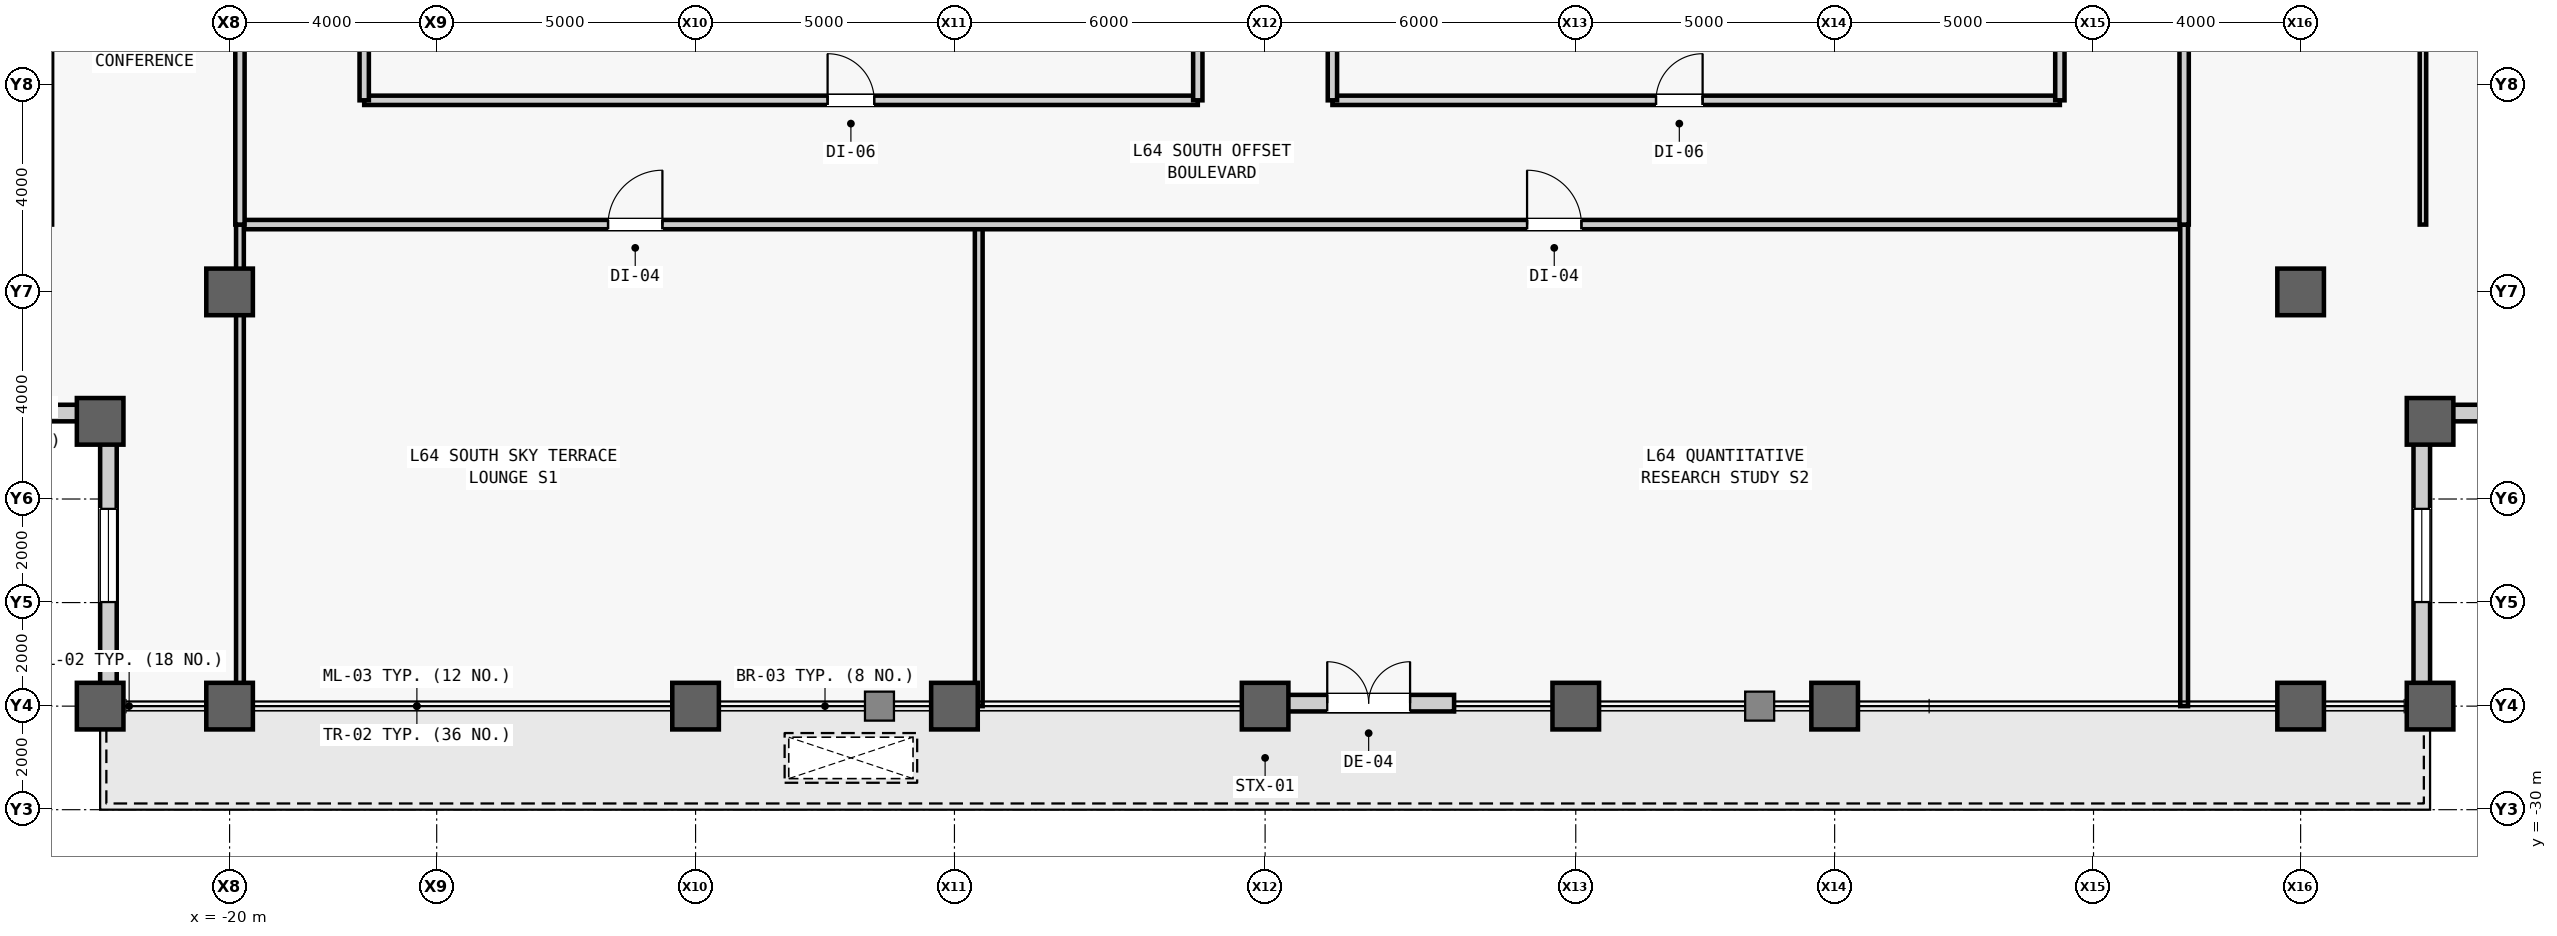
"""IFC4 building model, lengths in metres.
Left out: names, types, materials, properties, quantities, classifications, styles, units other than length and angle.
Written with IfcOpenShell. Run it as: python <this file> out.ifc"""

import sys

from ifc_helpers import new_model, si_unit, direction, frame, frame_2d, origin, origin_2d, place, context, subcontext, project, spatial, rectangle, hollow_rectangle, extrude, source, transform, mapped, element, fill, save


model = new_model("IFC4")
c1 = context("Model", 3, precision=1e-05, world=origin(), true_north=direction((0.0, 1.0)))
c2 = subcontext(c1, "Body", "Model", "MODEL_VIEW")
j1 = project(units=[si_unit("LENGTHUNIT", "METRE"), si_unit("PLANEANGLEUNIT", "RADIAN")], contexts=[c1])
p1 = place(None, origin())
s1 = spatial("IfcSite", under=j1, at=p1, CompositionType="ELEMENT")
p2 = place(p1, origin())
s2 = spatial("IfcBuilding", under=s1, at=p2, CompositionType="ELEMENT")
p3 = place(p2, frame((0.0, 0.0, 273.5)))
s3 = spatial("IfcBuildingStorey", under=s2, at=p3, CompositionType="ELEMENT", Elevation=273.5)
m1 = source(origin(), c2, "Body", "SweptSolid", [
    extrude(hollow_rectangle(XDim=0.9, YDim=0.9, WallThickness=0.05, at=origin_2d()), origin(), (0.0, 0.0, 1.0), 4.0),
])
for number, where, z_axis, x_axis in (
    (1, (-22.5, -28.0, 0.0), (0.0, 0.0, 1.0), (1.0, 0.0, 0.0)),
    (2, (-22.5, -22.5, 0.0), (0.0, 0.0, 1.0), (1.0, 0.0, 0.0)),
    (3, (-20.0, -28.0, 0.0), (0.0, 0.0, 1.0), (1.0, 0.0, 0.0)),
    (4, (-20.0, -20.0, 0.0), (0.0, 0.0, 1.0), (1.0, 0.0, 0.0)),
    (5, (-11.0, -28.0, 0.0), (0.0, 0.0, 1.0), (1.0, 0.0, 0.0)),
    (6, (-6.0, -28.0, 0.0), (0.0, 0.0, 1.0), (1.0, 0.0, 0.0)),
    (7, (0.0, -28.0, 0.0), (0.0, 0.0, 1.0), (1.0, 0.0, 0.0)),
    (8, (6.0, -28.0, 0.0), (0.0, 0.0, 1.0), (1.0, 0.0, 0.0)),
    (9, (11.0, -28.0, 0.0), (0.0, 0.0, 1.0), (1.0, 0.0, 0.0)),
    (10, (20.0, -28.0, 0.0), (0.0, 0.0, 1.0), (1.0, 0.0, 0.0)),
    (11, (20.0, -20.0, 0.0), (0.0, 0.0, 1.0), (1.0, 0.0, 0.0)),
    (12, (22.5, -28.0, 0.0), (0.0, 0.0, 1.0), (1.0, 0.0, 0.0)),
    (13, (22.5, -22.5, 0.0), (0.0, 0.0, 1.0), (1.0, 0.0, 0.0)),
):
    element("IfcColumn", number, at=place(p3, frame(where, z_axis=z_axis, x_axis=x_axis)), inside=s3, PredefinedType="COLUMN", context=c2, shape_type="MappedRepresentation", body=[
        mapped(m1, transform((0.0, 0.0, 0.0), scale=1.0)),
    ])
m2 = source(origin(), c2, "Body", "SweptSolid", [
    extrude(rectangle(XDim=5.18, YDim=0.32, at=frame_2d((2.59, 0.0))), origin(), (0.0, 0.0, 1.0), 3.231),
])
p4 = place(p3, frame((-22.5, -22.34, 0.0), z_axis=(0.0, 0.0, 1.0), x_axis=(-1.0, 0.0, 0.0)))
e14 = element("IfcWall", 14, at=p4, inside=s3, PredefinedType="STANDARD", context=c2, shape_type="MappedRepresentation", body=[
    mapped(m2, transform((0.0, 0.0, 0.0), scale=1.0)),
])
m3 = source(origin(), c2, "Body", "SweptSolid", [
    extrude(rectangle(XDim=1.8, YDim=2.4, at=frame_2d((0.9, 1.2))), frame((0.0, 0.17, 0.0), z_axis=(0.0, -1.0, 0.0), x_axis=(1.0, 0.0, 0.0)), (0.0, 0.0, 1.0), 0.34),
])
p5 = place(p4, frame((1.69, 0.0, 0.5)))
e15 = element("IfcOpeningElement", 15, at=p5, cuts=e14, PredefinedType="OPENING", context=c2, shape_type="MappedRepresentation", body=[
    mapped(m3, transform((0.0, 0.0, 0.0), scale=1.0)),
])
p6 = place(p3, frame((-22.34, -27.68, 0.0), z_axis=(0.0, 0.0, 1.0), x_axis=(0.0, 1.0, 0.0)))
e16 = element("IfcWall", 16, at=p6, inside=s3, PredefinedType="STANDARD", context=c2, shape_type="MappedRepresentation", body=[
    mapped(m2, transform((0.0, 0.0, 0.0), scale=1.0)),
])
p7 = place(p6, frame((1.69, 0.0, 0.5)))
e17 = element("IfcOpeningElement", 17, at=p7, cuts=e16, PredefinedType="OPENING", context=c2, shape_type="MappedRepresentation", body=[
    mapped(m3, transform((0.0, 0.0, 0.0), scale=1.0)),
])
p8 = place(p3, frame((22.34, -27.68, 0.0), z_axis=(0.0, 0.0, 1.0), x_axis=(0.0, 1.0, 0.0)))
e18 = element("IfcWall", 18, at=p8, inside=s3, PredefinedType="STANDARD", context=c2, shape_type="MappedRepresentation", body=[
    mapped(m2, transform((0.0, 0.0, 0.0), scale=1.0)),
])
p9 = place(p8, frame((1.69, 0.0, 0.5)))
e19 = element("IfcOpeningElement", 19, at=p9, cuts=e18, PredefinedType="OPENING", context=c2, shape_type="MappedRepresentation", body=[
    mapped(m3, transform((0.0, 0.0, 0.0), scale=1.0)),
])
p10 = place(p3, frame((22.5, -22.34, 0.0), z_axis=(0.0, 0.0, 1.0), x_axis=(1.0, 0.0, 0.0)))
e20 = element("IfcWall", 20, at=p10, inside=s3, PredefinedType="STANDARD", context=c2, shape_type="MappedRepresentation", body=[
    mapped(m2, transform((0.0, 0.0, 0.0), scale=1.0)),
])
p11 = place(p10, frame((1.69, 0.0, 0.5)))
e21 = element("IfcOpeningElement", 21, at=p11, cuts=e20, PredefinedType="OPENING", context=c2, shape_type="MappedRepresentation", body=[
    mapped(m3, transform((0.0, 0.0, 0.0), scale=1.0)),
])
m4 = source(origin(), c2, "Body", "SweptSolid", [
    extrude(rectangle(XDim=3.3, YDim=0.32, at=frame_2d((1.65, 0.0))), origin(), (0.0, 0.0, 1.0), 3.231),
])
p12 = place(p3, frame((0.35, -27.942, 0.0), z_axis=(0.0, 0.0, 1.0), x_axis=(1.0, 0.0, 0.0)))
e22 = element("IfcWall", 22, at=p12, inside=s3, PredefinedType="STANDARD", context=c2, shape_type="MappedRepresentation", body=[
    mapped(m4, transform((0.0, 0.0, 0.0), scale=1.0)),
])
m5 = source(origin(), c2, "Body", "SweptSolid", [
    extrude(rectangle(XDim=1.6, YDim=2.25, at=frame_2d((0.8, 1.125))), frame((0.0, 0.17, 0.0), z_axis=(0.0, -1.0, 0.0), x_axis=(1.0, 0.0, 0.0)), (0.0, 0.0, 1.0), 0.34),
])
p13 = place(p12, frame((0.85, 0.0, 0.0)))
e23 = element("IfcOpeningElement", 23, at=p13, cuts=e22, PredefinedType="OPENING", context=c2, shape_type="MappedRepresentation", body=[
    mapped(m5, transform((0.0, 0.0, 0.0), scale=1.0)),
])
m6 = source(origin(), c2, "Body", "SweptSolid", [
    extrude(rectangle(XDim=16.1, YDim=0.18, at=frame_2d((8.05, 0.0))), origin(), (0.0, 0.0, 1.0), 3.78),
])
p14 = place(p3, frame((-17.4, -16.3, 0.0), z_axis=(0.0, 0.0, 1.0), x_axis=(1.0, 0.0, 0.0)))
e24 = element("IfcWall", 24, at=p14, inside=s3, PredefinedType="PARTITIONING", context=c2, shape_type="MappedRepresentation", body=[
    mapped(m6, transform((0.0, 0.0, 0.0), scale=1.0)),
])
m7 = source(origin(), c2, "Body", "SweptSolid", [
    extrude(rectangle(XDim=0.9, YDim=2.15, at=frame_2d((0.45, 1.075))), frame((0.0, 0.1, 0.0), z_axis=(0.0, -1.0, 0.0), x_axis=(1.0, 0.0, 0.0)), (0.0, 0.0, 1.0), 0.2),
])
p15 = place(p14, frame((8.95, 0.0, 0.0)))
e25 = element("IfcOpeningElement", 25, at=p15, cuts=e24, PredefinedType="OPENING", context=c2, shape_type="MappedRepresentation", body=[
    mapped(m7, transform((0.0, 0.0, 0.0), scale=1.0)),
])
m8 = source(origin(), c2, "Body", "SweptSolid", [
    extrude(rectangle(XDim=6.5, YDim=0.18, at=frame_2d((3.25, 0.0))), origin(), (0.0, 0.0, 1.0), 3.78),
])
p16 = place(p3, frame((-17.4, -16.3, 0.0), z_axis=(0.0, 0.0, 1.0), x_axis=(0.0, 1.0, 0.0)))
e26 = element("IfcWall", 26, at=p16, inside=s3, PredefinedType="PARTITIONING", context=c2, shape_type="MappedRepresentation", body=[
    mapped(m8, transform((0.0, 0.0, 0.0), scale=1.0)),
])
m9 = source(origin(), c2, "Body", "SweptSolid", [
    extrude(rectangle(XDim=5.3, YDim=0.18, at=frame_2d((2.65, 0.0))), origin(), (0.0, 0.0, 1.0), 3.78),
])
p17 = place(p3, frame((-1.3, -16.3, 0.0), z_axis=(0.0, 0.0, 1.0), x_axis=(0.0, 1.0, 0.0)))
e27 = element("IfcWall", 27, at=p17, inside=s3, PredefinedType="PARTITIONING", context=c2, shape_type="MappedRepresentation", body=[
    mapped(m9, transform((0.0, 0.0, 0.0), scale=1.0)),
])
m10 = source(origin(), c2, "Body", "SweptSolid", [
    extrude(rectangle(XDim=14.05, YDim=0.18, at=frame_2d((7.025, 0.0))), origin(), (0.0, 0.0, 1.0), 3.78),
])
p18 = place(p3, frame((1.3, -16.3, 0.0), z_axis=(0.0, 0.0, 1.0), x_axis=(1.0, 0.0, 0.0)))
e28 = element("IfcWall", 28, at=p18, inside=s3, PredefinedType="PARTITIONING", context=c2, shape_type="MappedRepresentation", body=[
    mapped(m10, transform((0.0, 0.0, 0.0), scale=1.0)),
])
p19 = place(p18, frame((6.25, 0.0, 0.0)))
e29 = element("IfcOpeningElement", 29, at=p19, cuts=e28, PredefinedType="OPENING", context=c2, shape_type="MappedRepresentation", body=[
    mapped(m7, transform((0.0, 0.0, 0.0), scale=1.0)),
])
p20 = place(p3, frame((1.3, -16.3, 0.0), z_axis=(0.0, 0.0, 1.0), x_axis=(0.0, 1.0, 0.0)))
e30 = element("IfcWall", 30, at=p20, inside=s3, PredefinedType="PARTITIONING", context=c2, shape_type="MappedRepresentation", body=[
    mapped(m9, transform((0.0, 0.0, 0.0), scale=1.0)),
])
m11 = source(origin(), c2, "Body", "SweptSolid", [
    extrude(rectangle(XDim=5.8, YDim=0.18, at=frame_2d((2.9, 0.0))), origin(), (0.0, 0.0, 1.0), 3.78),
])
p21 = place(p3, frame((15.35, -16.3, 0.0), z_axis=(0.0, 0.0, 1.0), x_axis=(0.0, 1.0, 0.0)))
e31 = element("IfcWall", 31, at=p21, inside=s3, PredefinedType="PARTITIONING", context=c2, shape_type="MappedRepresentation", body=[
    mapped(m11, transform((0.0, 0.0, 0.0), scale=1.0)),
])
m12 = source(origin(), c2, "Body", "SweptSolid", [
    extrude(rectangle(XDim=9.3, YDim=0.15, at=frame_2d((4.65, 0.0))), origin(), (0.0, 0.0, 1.0), 3.78),
])
p22 = place(p3, frame((-5.531, -28.0, 0.0), z_axis=(0.0, 0.0, 1.0), x_axis=(0.0, 1.0, 0.0)))
e32 = element("IfcWall", 32, at=p22, inside=s3, PredefinedType="PARTITIONING", context=c2, shape_type="MappedRepresentation", body=[
    mapped(m12, transform((0.0, 0.0, 0.0), scale=1.0)),
])
m13 = source(origin(), c2, "Body", "SweptSolid", [
    extrude(rectangle(XDim=37.55, YDim=0.18, at=frame_2d((18.775, 0.0))), origin(), (0.0, 0.0, 1.0), 3.78),
])
p23 = place(p3, frame((-19.8, -18.7, 0.0), z_axis=(0.0, 0.0, 1.0), x_axis=(1.0, 0.0, 0.0)))
e33 = element("IfcWall", 33, at=p23, inside=s3, PredefinedType="PARTITIONING", context=c2, shape_type="MappedRepresentation", body=[
    mapped(m13, transform((0.0, 0.0, 0.0), scale=1.0)),
])
m14 = source(origin(), c2, "Body", "SweptSolid", [
    extrude(rectangle(XDim=1.05, YDim=2.2, at=frame_2d((0.525, 1.1))), frame((0.0, 0.1, 0.0), z_axis=(0.0, -1.0, 0.0), x_axis=(1.0, 0.0, 0.0)), (0.0, 0.0, 1.0), 0.2),
])
p24 = place(p23, frame((7.11, 0.0, 0.0)))
e34 = element("IfcOpeningElement", 34, at=p24, cuts=e33, PredefinedType="OPENING", context=c2, shape_type="MappedRepresentation", body=[
    mapped(m14, transform((0.0, 0.0, 0.0), scale=1.0)),
])
p25 = place(p23, frame((24.86, 0.0, 0.0)))
e35 = element("IfcOpeningElement", 35, at=p25, cuts=e33, PredefinedType="OPENING", context=c2, shape_type="MappedRepresentation", body=[
    mapped(m14, transform((0.0, 0.0, 0.0), scale=1.0)),
])
m15 = source(origin(), c2, "Body", "SweptSolid", [
    extrude(rectangle(XDim=9.3, YDim=0.15, at=frame_2d((4.65, 0.0))), origin(), (0.0, 0.0, 1.0), 3.164),
])
p26 = place(p3, frame((-19.8, -28.0, 0.0), z_axis=(0.0, 0.0, 1.0), x_axis=(0.0, 1.0, 0.0)))
e36 = element("IfcWall", 36, at=p26, inside=s3, PredefinedType="PARTITIONING", context=c2, shape_type="MappedRepresentation", body=[
    mapped(m15, transform((0.0, 0.0, 0.0), scale=1.0)),
])
p27 = place(p3, frame((17.75, -28.0, 0.0), z_axis=(0.0, 0.0, 1.0), x_axis=(0.0, 1.0, 0.0)))
e37 = element("IfcWall", 37, at=p27, inside=s3, PredefinedType="PARTITIONING", context=c2, shape_type="MappedRepresentation", body=[
    mapped(m12, transform((0.0, 0.0, 0.0), scale=1.0)),
])
m16 = source(origin(), c2, "Body", "SweptSolid", [
    extrude(rectangle(XDim=41.2, YDim=0.18, at=frame_2d((20.6, 0.0))), origin(), (0.0, 0.0, 1.0), 3.164),
])
p28 = place(p3, frame((-19.8, -18.7, 0.0), z_axis=(0.0, 0.0, 1.0), x_axis=(0.0, 1.0, 0.0)))
e38 = element("IfcWall", 38, at=p28, inside=s3, PredefinedType="PARTITIONING", context=c2, shape_type="MappedRepresentation", body=[
    mapped(m16, transform((0.0, 0.0, 0.0), scale=1.0)),
])
m17 = source(origin(), c2, "Body", "SweptSolid", [
    extrude(rectangle(XDim=0.95, YDim=2.15, at=frame_2d((0.475, 1.075))), frame((0.0, 0.1, 0.0), z_axis=(0.0, -1.0, 0.0), x_axis=(1.0, 0.0, 0.0)), (0.0, 0.0, 1.0), 0.2),
])
p29 = place(p28, frame((7.329, 0.0, 0.0)))
e39 = element("IfcOpeningElement", 39, at=p29, cuts=e38, PredefinedType="OPENING", context=c2, shape_type="MappedRepresentation", body=[
    mapped(m17, transform((0.0, 0.0, 0.0), scale=1.0)),
])
p30 = place(p28, frame((17.875, 0.0, 0.0)))
e40 = element("IfcOpeningElement", 40, at=p30, cuts=e38, PredefinedType="OPENING", context=c2, shape_type="MappedRepresentation", body=[
    mapped(m17, transform((0.0, 0.0, 0.0), scale=1.0)),
])
p31 = place(p28, frame((28.421, 0.0, 0.0)))
e41 = element("IfcOpeningElement", 41, at=p31, cuts=e38, PredefinedType="OPENING", context=c2, shape_type="MappedRepresentation", body=[
    mapped(m17, transform((0.0, 0.0, 0.0), scale=1.0)),
])
m18 = source(origin(), c2, "Body", "SweptSolid", [
    extrude(rectangle(XDim=17.35, YDim=0.125, at=frame_2d((8.675, 0.0))), origin(), (0.0, 0.0, 1.0), 3.164),
])
p32 = place(p3, frame((22.363, -18.7, 0.0), z_axis=(0.0, 0.0, 1.0), x_axis=(0.0, 1.0, 0.0)))
e42 = element("IfcWall", 42, at=p32, inside=s3, PredefinedType="PARTITIONING", context=c2, shape_type="MappedRepresentation", body=[
    mapped(m18, transform((0.0, 0.0, 0.0), scale=1.0)),
])
m19 = source(origin(), c2, "Body", "SweptSolid", [
    extrude(rectangle(XDim=0.95, YDim=2.15, at=frame_2d((0.475, 1.075))), frame((0.0, 0.073, 0.0), z_axis=(0.0, -1.0, 0.0), x_axis=(1.0, 0.0, 0.0)), (0.0, 0.0, 1.0), 0.145),
])
p33 = place(p32, frame((9.4, 0.0, 0.0)))
e43 = element("IfcOpeningElement", 43, at=p33, cuts=e42, PredefinedType="OPENING", context=c2, shape_type="MappedRepresentation", body=[
    mapped(m19, transform((0.0, 0.0, 0.0), scale=1.0)),
])
m20 = source(origin(), c2, "Body", "SweptSolid", [
    extrude(rectangle(XDim=41.2, YDim=0.18, at=frame_2d((20.6, 0.0))), origin(), (0.0, 0.0, 1.0), 3.78),
])
p34 = place(p3, frame((17.75, -18.7, 0.0), z_axis=(0.0, 0.0, 1.0), x_axis=(0.0, 1.0, 0.0)))
e44 = element("IfcWall", 44, at=p34, inside=s3, PredefinedType="PARTITIONING", context=c2, shape_type="MappedRepresentation", body=[
    mapped(m20, transform((0.0, 0.0, 0.0), scale=1.0)),
])
p35 = place(p34, frame((9.7, 0.0, 0.0)))
e45 = element("IfcOpeningElement", 45, at=p35, cuts=e44, PredefinedType="OPENING", context=c2, shape_type="MappedRepresentation", body=[
    mapped(m17, transform((0.0, 0.0, 0.0), scale=1.0)),
])
p36 = place(p34, frame((24.05, 0.0, 0.0)))
e46 = element("IfcOpeningElement", 46, at=p36, cuts=e44, PredefinedType="OPENING", context=c2, shape_type="MappedRepresentation", body=[
    mapped(m17, transform((0.0, 0.0, 0.0), scale=1.0)),
])
m21 = source(origin(), c2, "Body", "SweptSolid", [
    extrude(rectangle(XDim=1.8, YDim=2.4, at=frame_2d((0.9, 1.2))), frame((0.0, 0.03, 0.0), z_axis=(0.0, -1.0, 0.0), x_axis=(1.0, 0.0, 0.0)), (0.0, 0.0, 1.0), 0.06),
])
p37 = place(p7, origin())
e47 = element("IfcWindow", 47, at=p37, inside=s3, PartitioningType="SINGLE_PANEL", PredefinedType="WINDOW", context=c2, shape_type="MappedRepresentation", body=[
    mapped(m21, transform((0.0, 0.0, 0.0), scale=1.0)),
])
fill(e17, e47)
p38 = place(p9, origin())
e48 = element("IfcWindow", 48, at=p38, inside=s3, PartitioningType="SINGLE_PANEL", PredefinedType="WINDOW", context=c2, shape_type="MappedRepresentation", body=[
    mapped(m21, transform((0.0, 0.0, 0.0), scale=1.0)),
])
fill(e19, e48)
m22 = source(origin(), c2, "Body", "SweptSolid", [
    extrude(rectangle(XDim=1.6, YDim=2.25, at=frame_2d((0.8, 1.125))), frame((0.0, 0.025, 0.0), z_axis=(0.0, -1.0, 0.0), x_axis=(1.0, 0.0, 0.0)), (0.0, 0.0, 1.0), 0.05),
])
p39 = place(p13, origin())
e49 = element("IfcDoor", 49, at=p39, inside=s3, OperationType="DOUBLE_DOOR_SINGLE_SWING", PredefinedType="DOOR", context=c2, shape_type="MappedRepresentation", body=[
    mapped(m22, transform((0.0, 0.0, 0.0), scale=1.0)),
])
fill(e23, e49)
m23 = source(origin(), c2, "Body", "SweptSolid", [
    extrude(rectangle(XDim=0.9, YDim=2.15, at=frame_2d((0.45, 1.075))), frame((0.0, 0.025, 0.0), z_axis=(0.0, -1.0, 0.0), x_axis=(1.0, 0.0, 0.0)), (0.0, 0.0, 1.0), 0.05),
])
p40 = place(p15, origin())
e50 = element("IfcDoor", 50, at=p40, inside=s3, OperationType="SINGLE_SWING_LEFT", PredefinedType="DOOR", context=c2, shape_type="MappedRepresentation", body=[
    mapped(m23, transform((0.0, 0.0, 0.0), scale=1.0)),
])
fill(e25, e50)
p41 = place(p19, origin())
e51 = element("IfcDoor", 51, at=p41, inside=s3, OperationType="SINGLE_SWING_RIGHT", PredefinedType="DOOR", context=c2, shape_type="MappedRepresentation", body=[
    mapped(m23, transform((0.0, 0.0, 0.0), scale=1.0)),
])
fill(e29, e51)
m24 = source(origin(), c2, "Body", "SweptSolid", [
    extrude(rectangle(XDim=1.05, YDim=2.2, at=frame_2d((0.525, 1.1))), frame((0.0, 0.025, 0.0), z_axis=(0.0, -1.0, 0.0), x_axis=(1.0, 0.0, 0.0)), (0.0, 0.0, 1.0), 0.05),
])
p42 = place(p24, origin())
e52 = element("IfcDoor", 52, at=p42, inside=s3, OperationType="SINGLE_SWING_RIGHT", PredefinedType="DOOR", context=c2, shape_type="MappedRepresentation", body=[
    mapped(m24, transform((0.0, 0.0, 0.0), scale=1.0)),
])
fill(e34, e52)
p43 = place(p25, origin())
e53 = element("IfcDoor", 53, at=p43, inside=s3, OperationType="SINGLE_SWING_LEFT", PredefinedType="DOOR", context=c2, shape_type="MappedRepresentation", body=[
    mapped(m24, transform((0.0, 0.0, 0.0), scale=1.0)),
])
fill(e35, e53)
save(model, sys.argv[1])
